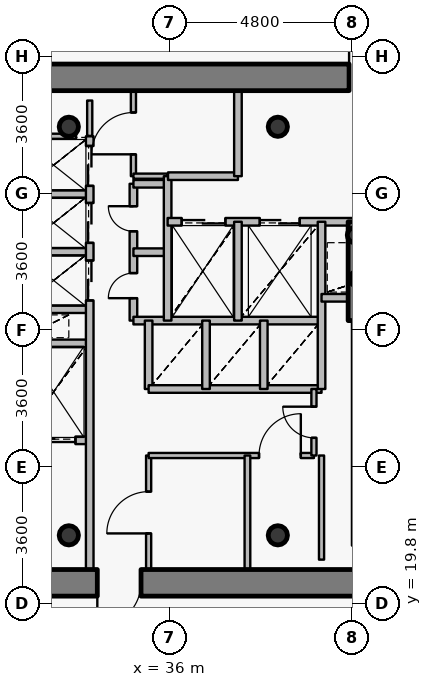
"""IFC4 building model, lengths in metres.
Left out: names, types, materials, properties, quantities, classifications, styles, units other than length and angle.
Written with IfcOpenShell. Run it as: python <this file> out.ifc"""

import sys

from ifc_helpers import new_model, si_unit, direction, frame, frame_2d, origin, origin_2d, place, context, subcontext, project, spatial, rectangle, hollow_circle, extrude, source, transform, mapped, element, fill, save


model = new_model("IFC4")
c1 = context("Model", 3, precision=1e-05, world=origin(), true_north=direction((0.0, 1.0)))
c2 = subcontext(c1, "Body", "Model", "MODEL_VIEW")
j1 = project(units=[si_unit("LENGTHUNIT", "METRE"), si_unit("PLANEANGLEUNIT", "RADIAN")], contexts=[c1])
p1 = place(None, origin())
s1 = spatial("IfcSite", under=j1, at=p1, CompositionType="ELEMENT")
p2 = place(p1, origin())
s2 = spatial("IfcBuilding", under=s1, at=p2, CompositionType="ELEMENT")
p3 = place(p2, frame((0.0, 0.0, 244.05)))
s3 = spatial("IfcBuildingStorey", under=s2, at=p3, CompositionType="ELEMENT", Elevation=244.05)
for number, where, z_axis, x_axis in (
    (1, (33.35, 21.6, 0.0), (0.0, 0.0, 1.0), (1.0, 0.0, 0.0)),
    (2, (38.85, 21.6, 0.0), (0.0, 0.0, 1.0), (1.0, 0.0, 0.0)),
    (3, (38.85, 32.35, 0.0), (0.0, 0.0, 1.0), (1.0, 0.0, 0.0)),
    (4, (33.35, 32.35, 0.0), (0.0, 0.0, 1.0), (1.0, 0.0, 0.0)),
):
    element("IfcColumn", number, at=place(p3, frame(where, z_axis=z_axis, x_axis=x_axis)), inside=s3, PredefinedType="COLUMN", context=c2, shape_type="SweptSolid", body=[
        extrude(hollow_circle(Radius=0.254, WallThickness=0.02, at=origin_2d()), origin(), (0.0, 0.0, 1.0), 3.75),
    ])
for number, where, z_axis, x_axis in (
    (5, (40.95, 28.35, 0.0), (0.0, 0.0, 1.0), (1.0, 0.0, 0.0)),
    (6, (40.88, 29.5, 0.0), (0.0, 0.0, 1.0), (1.0, 0.0, 0.0)),
):
    element("IfcColumn", number, at=place(p3, frame(where, z_axis=z_axis, x_axis=x_axis)), inside=s3, PredefinedType="COLUMN", context=c2, shape_type="SweptSolid", body=[
        extrude(hollow_circle(Radius=0.203, WallThickness=0.016, at=origin_2d()), origin(), (0.0, 0.0, 1.0), 3.75),
    ])
p4 = place(p3, frame((27.05, 33.65, 0.0), z_axis=(0.0, 0.0, 1.0), x_axis=(1.0, 0.0, 0.0)))
e7 = element("IfcWall", 7, at=p4, inside=s3, PredefinedType="SHEAR", context=c2, shape_type="SweptSolid", body=[
    extrude(rectangle(XDim=17.9, YDim=0.7, at=frame_2d((8.95, 0.0))), origin(), (0.0, 0.0, 1.0), 3.05),
])
p5 = place(p4, frame((13.675, 0.0, 0.0)))
e8 = element("IfcOpeningElement", 8, at=p5, cuts=e7, PredefinedType="OPENING", context=c2, shape_type="SweptSolid", body=[
    extrude(rectangle(XDim=1.15, YDim=2.15, at=origin_2d()), frame((0.575, 0.36, 1.075), z_axis=(0.0, -1.0, 0.0), x_axis=(1.0, 0.0, 0.0)), (0.0, 0.0, 1.0), 0.72),
])
p6 = place(p3, frame((44.95, 20.35, 0.0), z_axis=(0.0, 0.0, 1.0), x_axis=(-1.0, 0.0, 0.0)))
e9 = element("IfcWall", 9, at=p6, inside=s3, PredefinedType="SHEAR", context=c2, shape_type="SweptSolid", body=[
    extrude(rectangle(XDim=17.9, YDim=0.7, at=frame_2d((8.95, 0.0))), origin(), (0.0, 0.0, 1.0), 3.05),
])
p7 = place(p6, frame((9.7, 0.0, 0.0)))
e10 = element("IfcOpeningElement", 10, at=p7, cuts=e9, PredefinedType="OPENING", context=c2, shape_type="SweptSolid", body=[
    extrude(rectangle(XDim=1.15, YDim=2.15, at=origin_2d()), frame((0.575, 0.36, 1.075), z_axis=(0.0, -1.0, 0.0), x_axis=(1.0, 0.0, 0.0)), (0.0, 0.0, 1.0), 0.72),
])
p8 = place(p3, frame((40.9, 27.25, 0.0), z_axis=(0.0, 0.0, 1.0), x_axis=(0.0, 1.0, 0.0)))
e11 = element("IfcWall", 11, at=p8, inside=s3, PredefinedType="SHEAR", context=c2, shape_type="SweptSolid", body=[
    extrude(rectangle(XDim=2.6, YDim=0.4, at=frame_2d((1.3, 0.0))), origin(), (0.0, 0.0, 1.0), 3.1),
])
p9 = place(p3, frame((32.0, 24.1, 0.0), z_axis=(0.0, 0.0, 1.0), x_axis=(1.0, 0.0, 0.0)))
e12 = element("IfcWall", 12, at=p9, inside=s3, PredefinedType="PARTITIONING", context=c2, shape_type="SweptSolid", body=[
    extrude(rectangle(XDim=1.9, YDim=0.2, at=frame_2d((0.95, 0.0))), origin(), (0.0, 0.0, 1.0), 3.085),
])
p10 = place(p9, frame((0.375, 0.0, 0.0)))
e13 = element("IfcOpeningElement", 13, at=p10, cuts=e12, PredefinedType="OPENING", context=c2, shape_type="SweptSolid", body=[
    extrude(rectangle(XDim=1.15, YDim=2.15, at=origin_2d()), frame((0.575, 0.11, 1.075), z_axis=(0.0, -1.0, 0.0), x_axis=(1.0, 0.0, 0.0)), (0.0, 0.0, 1.0), 0.22),
])
for number, where, z_axis, x_axis in (
    (14, (32.0, 26.65, 0.0), (0.0, 0.0, 1.0), (1.0, 0.0, 0.0)),
    (15, (32.0, 27.55, 0.0), (0.0, 0.0, 1.0), (1.0, 0.0, 0.0)),
    (16, (32.0, 29.06, 0.0), (0.0, 0.0, 1.0), (1.0, 0.0, 0.0)),
    (17, (32.0, 30.58, 0.0), (0.0, 0.0, 1.0), (1.0, 0.0, 0.0)),
):
    element("IfcWall", number, at=place(p3, frame(where, z_axis=z_axis, x_axis=x_axis)), inside=s3, PredefinedType="PARTITIONING", context=c2, shape_type="SweptSolid", body=[
        extrude(rectangle(XDim=1.9, YDim=0.2, at=frame_2d((0.95, 0.0))), origin(), (0.0, 0.0, 1.0), 3.085),
    ])
p11 = place(p3, frame((33.9, 20.7, 0.0), z_axis=(0.0, 0.0, 1.0), x_axis=(0.0, 1.0, 0.0)))
e18 = element("IfcWall", 18, at=p11, inside=s3, PredefinedType="PARTITIONING", context=c2, shape_type="SweptSolid", body=[
    extrude(rectangle(XDim=11.4, YDim=0.2, at=frame_2d((5.7, 0.0))), origin(), (0.0, 0.0, 1.0), 3.085),
])
p12 = place(p11, frame((7.08, 0.0, 0.0)))
e19 = element("IfcOpeningElement", 19, at=p12, cuts=e18, PredefinedType="OPENING", context=c2, shape_type="SweptSolid", body=[
    extrude(rectangle(XDim=1.05, YDim=2.15, at=origin_2d()), frame((0.525, 0.11, 1.075), z_axis=(0.0, -1.0, 0.0), x_axis=(1.0, 0.0, 0.0)), (0.0, 0.0, 1.0), 0.22),
])
p13 = place(p11, frame((8.595, 0.0, 0.0)))
e20 = element("IfcOpeningElement", 20, at=p13, cuts=e18, PredefinedType="OPENING", context=c2, shape_type="SweptSolid", body=[
    extrude(rectangle(XDim=1.05, YDim=2.15, at=origin_2d()), frame((0.525, 0.11, 1.075), z_axis=(0.0, -1.0, 0.0), x_axis=(1.0, 0.0, 0.0)), (0.0, 0.0, 1.0), 0.22),
])
p14 = place(p11, frame((10.095, 0.0, 0.0)))
e21 = element("IfcOpeningElement", 21, at=p14, cuts=e18, PredefinedType="OPENING", context=c2, shape_type="SweptSolid", body=[
    extrude(rectangle(XDim=1.05, YDim=2.15, at=origin_2d()), frame((0.525, 0.11, 1.075), z_axis=(0.0, -1.0, 0.0), x_axis=(1.0, 0.0, 0.0)), (0.0, 0.0, 1.0), 0.22),
])
p15 = place(p3, frame((35.05, 27.25, 0.0), z_axis=(0.0, 0.0, 1.0), x_axis=(0.0, 1.0, 0.0)))
e22 = element("IfcWall", 22, at=p15, inside=s3, PredefinedType="PARTITIONING", context=c2, shape_type="SweptSolid", body=[
    extrude(rectangle(XDim=3.6, YDim=0.2, at=frame_2d((1.8, 0.0))), origin(), (0.0, 0.0, 1.0), 3.5),
])
p16 = place(p15, frame((0.59, 0.0, 0.0)))
e23 = element("IfcOpeningElement", 23, at=p16, cuts=e22, PredefinedType="OPENING", context=c2, shape_type="SweptSolid", body=[
    extrude(rectangle(XDim=0.66, YDim=2.05, at=origin_2d()), frame((0.33, 0.11, 1.025), z_axis=(0.0, -1.0, 0.0), x_axis=(1.0, 0.0, 0.0)), (0.0, 0.0, 1.0), 0.22),
])
p17 = place(p15, frame((2.35, 0.0, 0.0)))
e24 = element("IfcOpeningElement", 24, at=p17, cuts=e22, PredefinedType="OPENING", context=c2, shape_type="SweptSolid", body=[
    extrude(rectangle(XDim=0.66, YDim=2.05, at=origin_2d()), frame((0.33, 0.11, 1.025), z_axis=(0.0, -1.0, 0.0), x_axis=(1.0, 0.0, 0.0)), (0.0, 0.0, 1.0), 0.22),
])
p18 = place(p3, frame((35.05, 27.25, 0.0), z_axis=(0.0, 0.0, 1.0), x_axis=(1.0, 0.0, 0.0)))
e25 = element("IfcWall", 25, at=p18, inside=s3, PredefinedType="PARTITIONING", context=c2, shape_type="SweptSolid", body=[
    extrude(rectangle(XDim=4.95, YDim=0.2, at=frame_2d((2.475, 0.0))), origin(), (0.0, 0.0, 1.0), 3.085),
])
for number, where, z_axis, x_axis in (
    (26, (35.05, 29.05, 0.0), (0.0, 0.0, 1.0), (1.0, 0.0, 0.0)),
    (27, (35.05, 30.85, 0.0), (0.0, 0.0, 1.0), (1.0, 0.0, 0.0)),
):
    element("IfcWall", number, at=place(p3, frame(where, z_axis=z_axis, x_axis=x_axis)), inside=s3, PredefinedType="PARTITIONING", context=c2, shape_type="SweptSolid", body=[
        extrude(rectangle(XDim=0.9, YDim=0.2, at=frame_2d((0.45, 0.0))), origin(), (0.0, 0.0, 1.0), 3.5),
    ])
p19 = place(p3, frame((35.05, 31.05, 0.0), z_axis=(0.0, 0.0, 1.0), x_axis=(0.0, 1.0, 0.0)))
e28 = element("IfcWall", 28, at=p19, inside=s3, PredefinedType="PARTITIONING", context=c2, shape_type="SweptSolid", body=[
    extrude(rectangle(XDim=2.25, YDim=0.135, at=frame_2d((1.125, 0.0))), origin(), (0.0, 0.0, 1.0), 3.085),
])
p20 = place(p19, frame((0.575, 0.0, 0.0)))
e29 = element("IfcOpeningElement", 29, at=p20, cuts=e28, PredefinedType="OPENING", context=c2, shape_type="SweptSolid", body=[
    extrude(rectangle(XDim=1.1, YDim=2.15, at=origin_2d()), frame((0.55, 0.078, 1.075), z_axis=(0.0, -1.0, 0.0), x_axis=(1.0, 0.0, 0.0)), (0.0, 0.0, 1.0), 0.155),
])
p21 = place(p3, frame((35.05, 31.05, 0.0), z_axis=(0.0, 0.0, 1.0), x_axis=(1.0, 0.0, 0.0)))
e30 = element("IfcWall", 30, at=p21, inside=s3, PredefinedType="PARTITIONING", context=c2, shape_type="SweptSolid", body=[
    extrude(rectangle(XDim=0.9, YDim=0.135, at=frame_2d((0.45, 0.0))), origin(), (0.0, 0.0, 1.0), 3.5),
])
p22 = place(p3, frame((35.45, 20.7, 0.0), z_axis=(0.0, 0.0, 1.0), x_axis=(0.0, 1.0, 0.0)))
e31 = element("IfcWall", 31, at=p22, inside=s3, PredefinedType="PARTITIONING", context=c2, shape_type="SweptSolid", body=[
    extrude(rectangle(XDim=3.0, YDim=0.135, at=frame_2d((1.5, 0.0))), origin(), (0.0, 0.0, 1.0), 3.085),
])
p23 = place(p22, frame((0.95, 0.0, 0.0)))
e32 = element("IfcOpeningElement", 32, at=p23, cuts=e31, PredefinedType="OPENING", context=c2, shape_type="SweptSolid", body=[
    extrude(rectangle(XDim=1.1, YDim=2.15, at=origin_2d()), frame((0.55, 0.078, 1.075), z_axis=(0.0, -1.0, 0.0), x_axis=(1.0, 0.0, 0.0)), (0.0, 0.0, 1.0), 0.155),
])
p24 = place(p3, frame((35.45, 23.7, 0.0), z_axis=(0.0, 0.0, 1.0), x_axis=(1.0, 0.0, 0.0)))
e33 = element("IfcWall", 33, at=p24, inside=s3, PredefinedType="PARTITIONING", context=c2, shape_type="SweptSolid", body=[
    extrude(rectangle(XDim=4.35, YDim=0.135, at=frame_2d((2.175, 0.0))), origin(), (0.0, 0.0, 1.0), 3.085),
])
p25 = place(p24, frame((2.905, 0.0, 0.0)))
e34 = element("IfcOpeningElement", 34, at=p25, cuts=e33, PredefinedType="OPENING", context=c2, shape_type="SweptSolid", body=[
    extrude(rectangle(XDim=1.1, YDim=2.15, at=origin_2d()), frame((0.55, 0.078, 1.075), z_axis=(0.0, -1.0, 0.0), x_axis=(1.0, 0.0, 0.0)), (0.0, 0.0, 1.0), 0.155),
])
p26 = place(p3, frame((35.45, 25.45, 0.0), z_axis=(0.0, 0.0, 1.0), x_axis=(0.0, 1.0, 0.0)))
e35 = element("IfcWall", 35, at=p26, inside=s3, PredefinedType="PARTITIONING", context=c2, shape_type="SweptSolid", body=[
    extrude(rectangle(XDim=1.8, YDim=0.2, at=frame_2d((0.9, 0.0))), origin(), (0.0, 0.0, 1.0), 3.5),
])
p27 = place(p3, frame((35.45, 25.45, 0.0), z_axis=(0.0, 0.0, 1.0), x_axis=(1.0, 0.0, 0.0)))
e36 = element("IfcWall", 36, at=p27, inside=s3, PredefinedType="PARTITIONING", context=c2, shape_type="SweptSolid", body=[
    extrude(rectangle(XDim=4.55, YDim=0.2, at=frame_2d((2.275, 0.0))), origin(), (0.0, 0.0, 1.0), 3.085),
])
p28 = place(p3, frame((35.95, 27.25, 0.0), z_axis=(0.0, 0.0, 1.0), x_axis=(0.0, 1.0, 0.0)))
e37 = element("IfcWall", 37, at=p28, inside=s3, PredefinedType="PARTITIONING", context=c2, shape_type="SweptSolid", body=[
    extrude(rectangle(XDim=3.8, YDim=0.2, at=frame_2d((1.9, 0.0))), origin(), (0.0, 0.0, 1.0), 3.5),
])
p29 = place(p3, frame((35.95, 29.85, 0.0), z_axis=(0.0, 0.0, 1.0), x_axis=(1.0, 0.0, 0.0)))
e38 = element("IfcWall", 38, at=p29, inside=s3, PredefinedType="PARTITIONING", context=c2, shape_type="SweptSolid", body=[
    extrude(rectangle(XDim=8.49, YDim=0.2, at=frame_2d((4.245, 0.0))), origin(), (0.0, 0.0, 1.0), 3.085),
])
p30 = place(p29, frame((6.1, 0.0, 0.0)))
e39 = element("IfcOpeningElement", 39, at=p30, cuts=e38, PredefinedType="OPENING", context=c2, shape_type="SweptSolid", body=[
    extrude(rectangle(XDim=1.2, YDim=2.15, at=origin_2d()), frame((0.6, 0.11, 1.075), z_axis=(0.0, -1.0, 0.0), x_axis=(1.0, 0.0, 0.0)), (0.0, 0.0, 1.0), 0.22),
])
p31 = place(p29, frame((0.37, 0.0, 0.0)))
e40 = element("IfcOpeningElement", 40, at=p31, cuts=e38, PredefinedType="OPENING", context=c2, shape_type="SweptSolid", body=[
    extrude(rectangle(XDim=1.15, YDim=2.15, at=origin_2d()), frame((0.575, 0.11, 1.075), z_axis=(0.0, -1.0, 0.0), x_axis=(1.0, 0.0, 0.0)), (0.0, 0.0, 1.0), 0.22),
])
p32 = place(p29, frame((2.425, 0.0, 0.0)))
e41 = element("IfcOpeningElement", 41, at=p32, cuts=e38, PredefinedType="OPENING", context=c2, shape_type="SweptSolid", body=[
    extrude(rectangle(XDim=1.05, YDim=2.15, at=origin_2d()), frame((0.525, 0.11, 1.075), z_axis=(0.0, -1.0, 0.0), x_axis=(1.0, 0.0, 0.0)), (0.0, 0.0, 1.0), 0.22),
])
p33 = place(p3, frame((35.96, 31.05, 0.0), z_axis=(0.0, 0.0, 1.0), x_axis=(1.0, 0.0, 0.0)))
e42 = element("IfcWall", 42, at=p33, inside=s3, PredefinedType="PARTITIONING", context=c2, shape_type="SweptSolid", body=[
    extrude(rectangle(XDim=1.84, YDim=0.2, at=frame_2d((0.92, 0.0))), origin(), (0.0, 0.0, 1.0), 3.5),
])
p34 = place(p3, frame((36.96, 25.45, 0.0), z_axis=(0.0, 0.0, 1.0), x_axis=(0.0, 1.0, 0.0)))
e43 = element("IfcWall", 43, at=p34, inside=s3, PredefinedType="PARTITIONING", context=c2, shape_type="SweptSolid", body=[
    extrude(rectangle(XDim=1.8, YDim=0.2, at=frame_2d((0.9, 0.0))), origin(), (0.0, 0.0, 1.0), 3.5),
])
p35 = place(p3, frame((37.8, 27.25, 0.0), z_axis=(0.0, 0.0, 1.0), x_axis=(0.0, 1.0, 0.0)))
e44 = element("IfcWall", 44, at=p35, inside=s3, PredefinedType="PARTITIONING", context=c2, shape_type="SweptSolid", body=[
    extrude(rectangle(XDim=2.6, YDim=0.2, at=frame_2d((1.3, 0.0))), origin(), (0.0, 0.0, 1.0), 3.5),
])
p36 = place(p3, frame((37.8, 31.05, 0.0), z_axis=(0.0, 0.0, 1.0), x_axis=(0.0, 1.0, 0.0)))
e45 = element("IfcWall", 45, at=p36, inside=s3, PredefinedType="PARTITIONING", context=c2, shape_type="SweptSolid", body=[
    extrude(rectangle(XDim=2.25, YDim=0.2, at=frame_2d((1.125, 0.0))), origin(), (0.0, 0.0, 1.0), 3.085),
])
p37 = place(p3, frame((38.05, 20.18, 0.0), z_axis=(0.0, 0.0, 1.0), x_axis=(0.0, 1.0, 0.0)))
e46 = element("IfcWall", 46, at=p37, inside=s3, PredefinedType="PARTITIONING", context=c2, shape_type="SweptSolid", body=[
    extrude(rectangle(XDim=3.52, YDim=0.15, at=frame_2d((1.76, 0.0))), origin(), (0.0, 0.0, 1.0), 3.035),
])
p38 = place(p3, frame((38.48, 25.45, 0.0), z_axis=(0.0, 0.0, 1.0), x_axis=(0.0, 1.0, 0.0)))
e47 = element("IfcWall", 47, at=p38, inside=s3, PredefinedType="PARTITIONING", context=c2, shape_type="SweptSolid", body=[
    extrude(rectangle(XDim=1.8, YDim=0.2, at=frame_2d((0.9, 0.0))), origin(), (0.0, 0.0, 1.0), 3.5),
])
p39 = place(p3, frame((39.8, 23.7, 0.0), z_axis=(0.0, 0.0, 1.0), x_axis=(0.0, 1.0, 0.0)))
e48 = element("IfcWall", 48, at=p39, inside=s3, PredefinedType="PARTITIONING", context=c2, shape_type="SweptSolid", body=[
    extrude(rectangle(XDim=1.75, YDim=0.135, at=frame_2d((0.875, 0.0))), origin(), (0.0, 0.0, 1.0), 3.5),
])
p40 = place(p39, frame((0.465, 0.0, 0.0)))
e49 = element("IfcOpeningElement", 49, at=p40, cuts=e48, PredefinedType="OPENING", context=c2, shape_type="SweptSolid", body=[
    extrude(rectangle(XDim=0.82, YDim=2.1, at=origin_2d()), frame((0.41, 0.078, 1.05), z_axis=(0.0, -1.0, 0.0), x_axis=(1.0, 0.0, 0.0)), (0.0, 0.0, 1.0), 0.155),
])
p41 = place(p3, frame((40.0, 25.45, 0.0), z_axis=(0.0, 0.0, 1.0), x_axis=(0.0, 1.0, 0.0)))
e50 = element("IfcWall", 50, at=p41, inside=s3, PredefinedType="PARTITIONING", context=c2, shape_type="SweptSolid", body=[
    extrude(rectangle(XDim=4.4, YDim=0.2, at=frame_2d((2.2, 0.0))), origin(), (0.0, 0.0, 1.0), 3.5),
])
p42 = place(p3, frame((40.0, 27.85, 0.0), z_axis=(0.0, 0.0, 1.0), x_axis=(1.0, 0.0, 0.0)))
e51 = element("IfcWall", 51, at=p42, inside=s3, PredefinedType="PARTITIONING", context=c2, shape_type="SweptSolid", body=[
    extrude(rectangle(XDim=0.9, YDim=0.2, at=frame_2d((0.45, 0.0))), origin(), (0.0, 0.0, 1.0), 3.5),
])
p43 = place(p3, frame((40.9, 21.33, 0.0), z_axis=(0.0, 0.0, 1.0), x_axis=(0.0, 1.0, 0.0)))
e52 = element("IfcWall", 52, at=p43, inside=s3, PredefinedType="PARTITIONING", context=c2, shape_type="SweptSolid", body=[
    extrude(rectangle(XDim=5.91, YDim=0.2, at=frame_2d((2.955, 0.0))), origin(), (0.0, 0.0, 1.0), 3.035),
])
p44 = place(p3, frame((32.36, 32.1, 0.0), z_axis=(0.0, 0.0, 1.0), x_axis=(1.0, 0.0, 0.0)))
e53 = element("IfcWall", 53, at=p44, inside=s3, PredefinedType="PARTITIONING", context=c2, shape_type="SweptSolid", body=[
    extrude(rectangle(XDim=1.18, YDim=0.135, at=frame_2d((0.59, 0.0))), origin(), (0.0, 0.0, 1.0), 3.085),
])
p45 = place(p3, frame((40.0, 23.7, 0.0), z_axis=(0.0, 0.0, 1.0), x_axis=(0.0, -1.0, 0.0)))
e54 = element("IfcWall", 54, at=p45, inside=s3, PredefinedType="PARTITIONING", context=c2, shape_type="SweptSolid", body=[
    extrude(rectangle(XDim=2.74, YDim=0.135, at=frame_2d((1.37, 0.0))), origin(), (0.0, 0.0, 1.0), 3.035),
])
p46 = place(p3, frame((33.9, 32.11, 0.0), z_axis=(0.0, 0.0, 1.0), x_axis=(0.0, 1.0, 0.0)))
e55 = element("IfcWall", 55, at=p46, inside=s3, PredefinedType="PARTITIONING", context=c2, shape_type="SweptSolid", body=[
    extrude(rectangle(XDim=0.93, YDim=0.135, at=frame_2d((0.465, 0.0))), origin(), (0.0, 0.0, 1.0), 3.085),
])
m1 = source(origin(), c2, "Body", "SweptSolid", [
    extrude(rectangle(XDim=1.15, YDim=2.15, at=origin_2d()), frame((0.575, 0.025, 1.075), z_axis=(0.0, -1.0, 0.0), x_axis=(1.0, 0.0, 0.0)), (0.0, 0.0, 1.0), 0.05),
])
p47 = place(p5, origin())
e56 = element("IfcDoor", 56, at=p47, inside=s3, OperationType="SINGLE_SWING_LEFT", PredefinedType="DOOR", context=c2, shape_type="MappedRepresentation", body=[
    mapped(m1, transform((0.0, 0.0, 0.0), x_axis=(1.0, 0.0, 0.0), y_axis=(0.0, 1.0, 0.0), z_axis=(0.0, 0.0, 1.0), scale=1.0)),
])
fill(e8, e56)
p48 = place(p7, origin())
e57 = element("IfcDoor", 57, at=p48, inside=s3, OperationType="SINGLE_SWING_RIGHT", PredefinedType="DOOR", context=c2, shape_type="MappedRepresentation", body=[
    mapped(m1, transform((0.0, 0.0, 0.0), x_axis=(1.0, 0.0, 0.0), y_axis=(0.0, 1.0, 0.0), z_axis=(0.0, 0.0, 1.0), scale=1.0)),
])
fill(e10, e57)
m2 = source(origin(), c2, "Body", "SweptSolid", [
    extrude(rectangle(XDim=1.15, YDim=2.15, at=origin_2d()), frame((0.575, 0.025, 1.075), z_axis=(0.0, -1.0, 0.0), x_axis=(1.0, 0.0, 0.0)), (0.0, 0.0, 1.0), 0.05),
])
p49 = place(p31, origin())
e58 = element("IfcDoor", 58, at=p49, inside=s3, OperationType="DOUBLE_DOOR_SLIDING", PredefinedType="USERDEFINED", context=c2, shape_type="MappedRepresentation", body=[
    mapped(m2, transform((0.0, 0.0, 0.0), x_axis=(1.0, 0.0, 0.0), y_axis=(0.0, 1.0, 0.0), z_axis=(0.0, 0.0, 1.0), scale=1.0)),
])
fill(e40, e58)
p50 = place(p10, origin())
e59 = element("IfcDoor", 59, at=p50, inside=s3, OperationType="DOUBLE_DOOR_SLIDING", PredefinedType="USERDEFINED", context=c2, shape_type="MappedRepresentation", body=[
    mapped(m2, transform((0.0, 0.0, 0.0), x_axis=(1.0, 0.0, 0.0), y_axis=(0.0, 1.0, 0.0), z_axis=(0.0, 0.0, 1.0), scale=1.0)),
])
fill(e13, e59)
m3 = source(origin(), c2, "Body", "SweptSolid", [
    extrude(rectangle(XDim=1.05, YDim=2.15, at=origin_2d()), frame((0.525, 0.025, 1.075), z_axis=(0.0, -1.0, 0.0), x_axis=(1.0, 0.0, 0.0)), (0.0, 0.0, 1.0), 0.05),
])
p51 = place(p32, origin())
e60 = element("IfcDoor", 60, at=p51, inside=s3, OperationType="DOUBLE_DOOR_SLIDING", PredefinedType="USERDEFINED", context=c2, shape_type="MappedRepresentation", body=[
    mapped(m3, transform((0.0, 0.0, 0.0), x_axis=(1.0, 0.0, 0.0), y_axis=(0.0, 1.0, 0.0), z_axis=(0.0, 0.0, 1.0), scale=1.0)),
])
fill(e41, e60)
p52 = place(p12, origin())
e61 = element("IfcDoor", 61, at=p52, inside=s3, OperationType="DOUBLE_DOOR_SLIDING", PredefinedType="USERDEFINED", context=c2, shape_type="MappedRepresentation", body=[
    mapped(m3, transform((0.0, 0.0, 0.0), x_axis=(1.0, 0.0, 0.0), y_axis=(0.0, 1.0, 0.0), z_axis=(0.0, 0.0, 1.0), scale=1.0)),
])
fill(e19, e61)
p53 = place(p13, origin())
e62 = element("IfcDoor", 62, at=p53, inside=s3, OperationType="DOUBLE_DOOR_SLIDING", PredefinedType="USERDEFINED", context=c2, shape_type="MappedRepresentation", body=[
    mapped(m3, transform((0.0, 0.0, 0.0), x_axis=(1.0, 0.0, 0.0), y_axis=(0.0, 1.0, 0.0), z_axis=(0.0, 0.0, 1.0), scale=1.0)),
])
fill(e20, e62)
p54 = place(p14, origin())
e63 = element("IfcDoor", 63, at=p54, inside=s3, OperationType="DOUBLE_DOOR_SLIDING", PredefinedType="USERDEFINED", context=c2, shape_type="MappedRepresentation", body=[
    mapped(m3, transform((0.0, 0.0, 0.0), x_axis=(1.0, 0.0, 0.0), y_axis=(0.0, 1.0, 0.0), z_axis=(0.0, 0.0, 1.0), scale=1.0)),
])
fill(e21, e63)
m4 = source(origin(), c2, "Body", "SweptSolid", [
    extrude(rectangle(XDim=0.66, YDim=2.05, at=origin_2d()), frame((0.33, 0.025, 1.025), z_axis=(0.0, -1.0, 0.0), x_axis=(1.0, 0.0, 0.0)), (0.0, 0.0, 1.0), 0.05),
])
p55 = place(p16, origin())
e64 = element("IfcDoor", 64, at=p55, inside=s3, OperationType="SINGLE_SWING_LEFT", PredefinedType="USERDEFINED", context=c2, shape_type="MappedRepresentation", body=[
    mapped(m4, transform((0.0, 0.0, 0.0), x_axis=(1.0, 0.0, 0.0), y_axis=(0.0, 1.0, 0.0), z_axis=(0.0, 0.0, 1.0), scale=1.0)),
])
fill(e23, e64)
p56 = place(p17, origin())
e65 = element("IfcDoor", 65, at=p56, inside=s3, OperationType="SINGLE_SWING_RIGHT", PredefinedType="USERDEFINED", context=c2, shape_type="MappedRepresentation", body=[
    mapped(m4, transform((0.0, 0.0, 0.0), x_axis=(1.0, 0.0, 0.0), y_axis=(0.0, 1.0, 0.0), z_axis=(0.0, 0.0, 1.0), scale=1.0)),
])
fill(e24, e65)
m5 = source(origin(), c2, "Body", "SweptSolid", [
    extrude(rectangle(XDim=1.1, YDim=2.15, at=origin_2d()), frame((0.55, 0.025, 1.075), z_axis=(0.0, -1.0, 0.0), x_axis=(1.0, 0.0, 0.0)), (0.0, 0.0, 1.0), 0.05),
])
p57 = place(p23, origin())
e66 = element("IfcDoor", 66, at=p57, inside=s3, OperationType="SINGLE_SWING_LEFT", PredefinedType="DOOR", context=c2, shape_type="MappedRepresentation", body=[
    mapped(m5, transform((0.0, 0.0, 0.0), x_axis=(1.0, 0.0, 0.0), y_axis=(0.0, 1.0, 0.0), z_axis=(0.0, 0.0, 1.0), scale=1.0)),
])
fill(e32, e66)
p58 = place(p25, origin())
e67 = element("IfcDoor", 67, at=p58, inside=s3, OperationType="SINGLE_SWING_RIGHT", PredefinedType="DOOR", context=c2, shape_type="MappedRepresentation", body=[
    mapped(m5, transform((0.0, 0.0, 0.0), x_axis=(1.0, 0.0, 0.0), y_axis=(0.0, 1.0, 0.0), z_axis=(0.0, 0.0, 1.0), scale=1.0)),
])
fill(e34, e67)
p59 = place(p20, origin())
e68 = element("IfcDoor", 68, at=p59, inside=s3, OperationType="SINGLE_SWING_LEFT", PredefinedType="DOOR", context=c2, shape_type="MappedRepresentation", body=[
    mapped(m5, transform((0.0, 0.0, 0.0), x_axis=(1.0, 0.0, 0.0), y_axis=(0.0, 1.0, 0.0), z_axis=(0.0, 0.0, 1.0), scale=1.0)),
])
fill(e29, e68)
m6 = source(origin(), c2, "Body", "SweptSolid", [
    extrude(rectangle(XDim=0.82, YDim=2.1, at=origin_2d()), frame((0.41, 0.025, 1.05), z_axis=(0.0, -1.0, 0.0), x_axis=(1.0, 0.0, 0.0)), (0.0, 0.0, 1.0), 0.05),
])
p60 = place(p40, origin())
e69 = element("IfcDoor", 69, at=p60, inside=s3, OperationType="SINGLE_SWING_RIGHT", PredefinedType="DOOR", context=c2, shape_type="MappedRepresentation", body=[
    mapped(m6, transform((0.0, 0.0, 0.0), x_axis=(1.0, 0.0, 0.0), y_axis=(0.0, 1.0, 0.0), z_axis=(0.0, 0.0, 1.0), scale=1.0)),
])
fill(e49, e69)
save(model, sys.argv[1])
